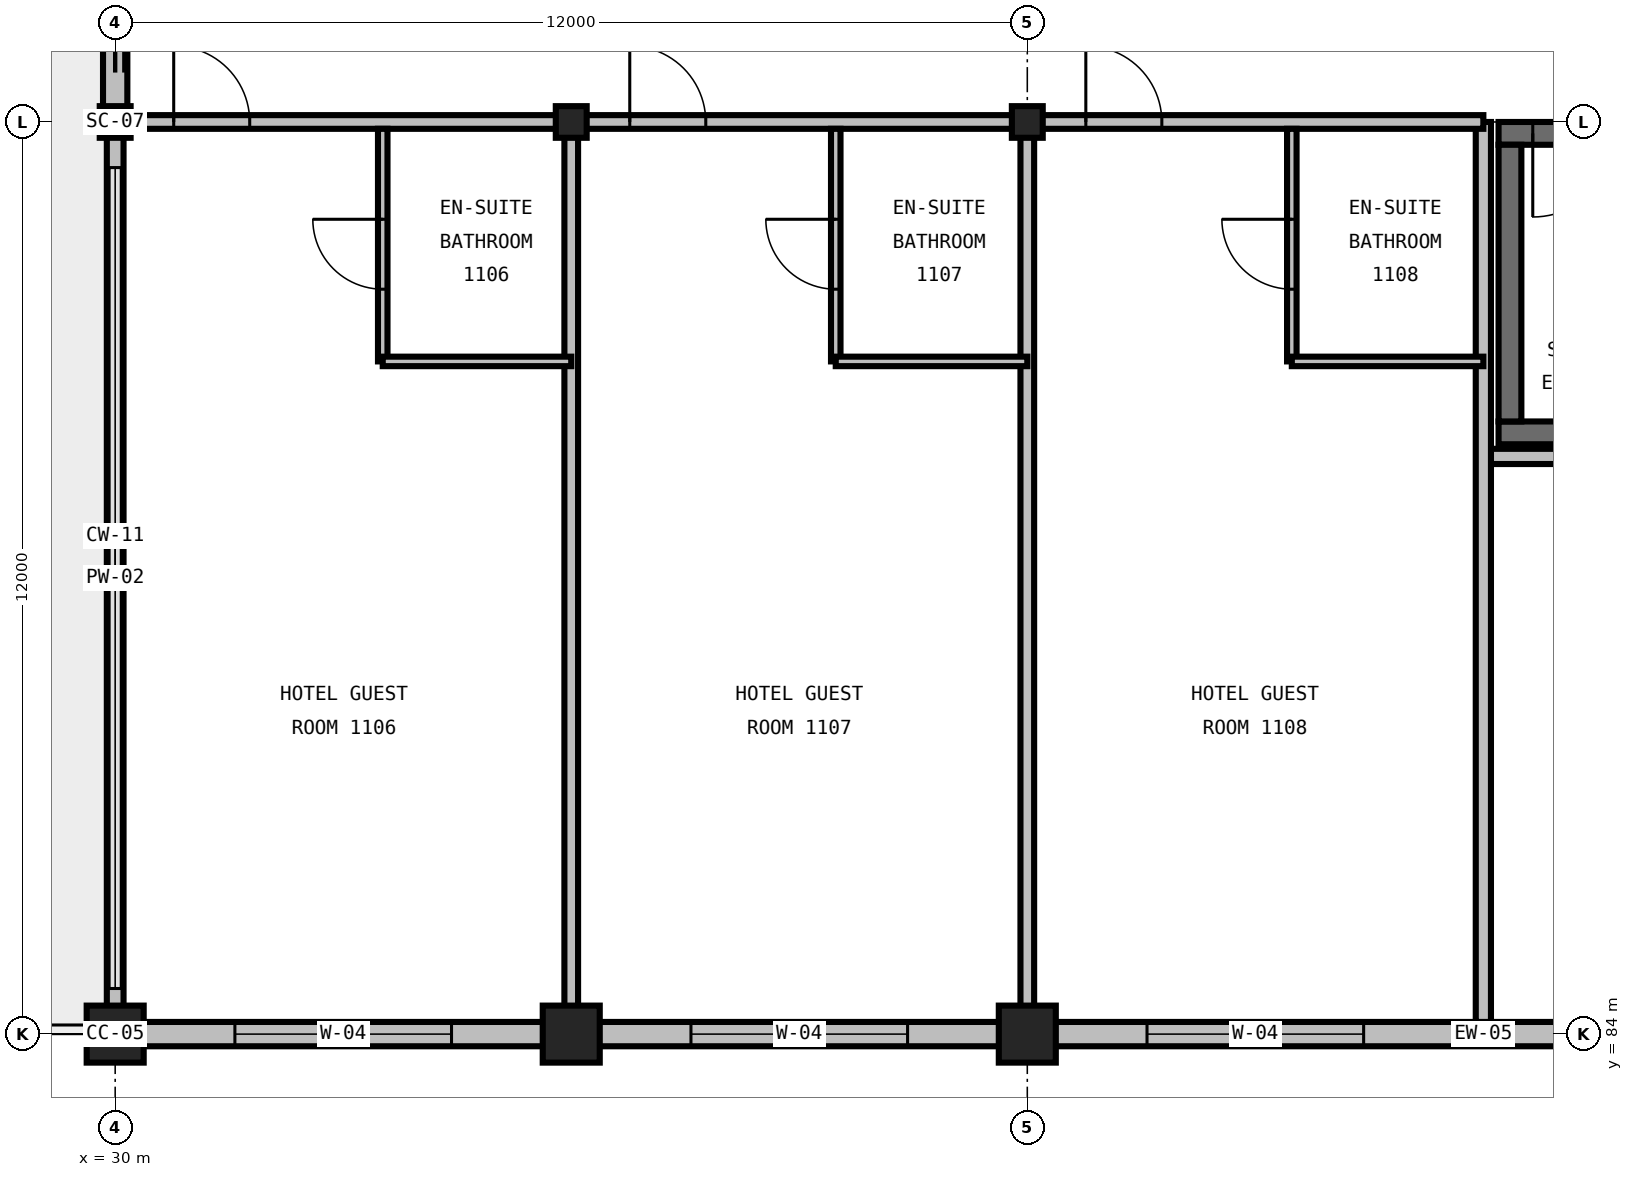
"""IFC4 building model, lengths in metres.
Left out: names, types, materials, properties, quantities, classifications, styles, units other than length and angle.
Written with IfcOpenShell. Run it as: python <this file> out.ifc"""

import sys

from ifc_helpers import new_model, si_unit, direction, frame, frame_2d, origin, origin_2d, place, context, subcontext, project, spatial, rectangle, i_section, extrude, element, fill, save


model = new_model("IFC4")
c1 = context("Model", 3, precision=1e-05, world=origin(), true_north=direction((0.0, 1.0)))
c2 = subcontext(c1, "Body", "Model", "MODEL_VIEW")
j1 = project(units=[si_unit("LENGTHUNIT", "METRE"), si_unit("PLANEANGLEUNIT", "RADIAN")], contexts=[c1])
p1 = place(None, origin())
s1 = spatial("IfcSite", under=j1, at=p1, CompositionType="ELEMENT")
p2 = place(p1, origin())
s2 = spatial("IfcBuilding", under=s1, at=p2, CompositionType="ELEMENT")
p3 = place(p2, frame((0.0, 0.0, 49.2)))
s3 = spatial("IfcBuildingStorey", under=s2, at=p3, CompositionType="ELEMENT", Elevation=49.2)
p4 = place(p3, frame((30.0, 84.0, 0.0), z_axis=(0.0, 0.0, 1.0), x_axis=(1.0, 0.0, 0.0)))
e1 = element("IfcColumn", 1, at=p4, inside=s3, PredefinedType="COLUMN", context=c2, shape_type="SweptSolid", body=[
    extrude(rectangle(XDim=0.75, YDim=0.75, at=origin_2d()), origin(), (0.0, 0.0, 1.0), 3.6),
])
p5 = place(p3, frame((30.0, 96.0, 0.0), z_axis=(0.0, 0.0, 1.0), x_axis=(1.0, 0.0, 0.0)))
e2 = element("IfcColumn", 2, at=p5, inside=s3, PredefinedType="COLUMN", context=c2, shape_type="SweptSolid", body=[
    extrude(i_section(OverallWidth=0.406, OverallDepth=0.416, WebThickness=0.03, FlangeThickness=0.048, FilletRadius=0.031, at=origin_2d()), origin(), (0.0, 0.0, 1.0), 3.6),
])
p6 = place(p3, frame((36.0, 84.0, 0.0), z_axis=(0.0, 0.0, 1.0), x_axis=(1.0, 0.0, 0.0)))
e3 = element("IfcColumn", 3, at=p6, inside=s3, PredefinedType="COLUMN", context=c2, shape_type="SweptSolid", body=[
    extrude(rectangle(XDim=0.75, YDim=0.75, at=origin_2d()), origin(), (0.0, 0.0, 1.0), 3.6),
])
p7 = place(p3, frame((36.0, 96.0, 0.0), z_axis=(0.0, 0.0, 1.0), x_axis=(1.0, 0.0, 0.0)))
e4 = element("IfcColumn", 4, at=p7, inside=s3, PredefinedType="COLUMN", context=c2, shape_type="SweptSolid", body=[
    extrude(i_section(OverallWidth=0.406, OverallDepth=0.416, WebThickness=0.03, FlangeThickness=0.048, FilletRadius=0.031, at=origin_2d()), origin(), (0.0, 0.0, 1.0), 3.6),
])
p8 = place(p3, frame((42.0, 84.0, 0.0), z_axis=(0.0, 0.0, 1.0), x_axis=(1.0, 0.0, 0.0)))
e5 = element("IfcColumn", 5, at=p8, inside=s3, PredefinedType="COLUMN", context=c2, shape_type="SweptSolid", body=[
    extrude(rectangle(XDim=0.75, YDim=0.75, at=origin_2d()), origin(), (0.0, 0.0, 1.0), 3.6),
])
p9 = place(p3, frame((42.0, 96.0, 0.0), z_axis=(0.0, 0.0, 1.0), x_axis=(1.0, 0.0, 0.0)))
e6 = element("IfcColumn", 6, at=p9, inside=s3, PredefinedType="COLUMN", context=c2, shape_type="SweptSolid", body=[
    extrude(i_section(OverallWidth=0.406, OverallDepth=0.416, WebThickness=0.03, FlangeThickness=0.048, FilletRadius=0.031, at=origin_2d()), origin(), (0.0, 0.0, 1.0), 3.6),
])
p10 = place(p3, frame((48.2, 91.91, 0.0), z_axis=(0.0, 0.0, 1.0), x_axis=(1.0, 0.0, 0.0)))
e7 = element("IfcWall", 7, at=p10, inside=s3, PredefinedType="SHEAR", context=c2, shape_type="SweptSolid", body=[
    extrude(rectangle(XDim=9.8, YDim=0.3, at=frame_2d((4.9, 0.0))), origin(), (0.0, 0.0, 1.0), 3.6),
])
p11 = place(p3, frame((58.0, 95.85, 0.0), z_axis=(0.0, 0.0, 1.0), x_axis=(-1.0, 0.0, 0.0)))
e8 = element("IfcWall", 8, at=p11, inside=s3, PredefinedType="SHEAR", context=c2, shape_type="SweptSolid", body=[
    extrude(rectangle(XDim=9.8, YDim=0.3, at=frame_2d((4.9, 0.0))), origin(), (0.0, 0.0, 1.0), 3.6),
])
p12 = place(p11, frame((8.25, 0.0, 0.0)))
e9 = element("IfcOpeningElement", 9, at=p12, cuts=e8, PredefinedType="OPENING", context=c2, shape_type="SweptSolid", body=[
    extrude(rectangle(XDim=1.1, YDim=2.2, at=frame_2d((0.55, 1.1))), frame((0.0, 0.165, 0.0), z_axis=(0.0, -1.0, 0.0), x_axis=(1.0, 0.0, 0.0)), (0.0, 0.0, 1.0), 0.33),
])
p13 = place(p3, frame((48.35, 95.7, 0.0), z_axis=(0.0, 0.0, 1.0), x_axis=(0.0, -1.0, 0.0)))
e10 = element("IfcWall", 10, at=p13, inside=s3, PredefinedType="SHEAR", context=c2, shape_type="SweptSolid", body=[
    extrude(rectangle(XDim=3.64, YDim=0.3, at=frame_2d((1.82, 0.0))), origin(), (0.0, 0.0, 1.0), 3.6),
])
p14 = place(p3, frame((30.0, 84.0, 0.0), z_axis=(0.0, 0.0, 1.0), x_axis=(1.0, 0.0, 0.0)))
e11 = element("IfcWall", 11, at=p14, inside=s3, PredefinedType="STANDARD", context=c2, shape_type="SweptSolid", body=[
    extrude(rectangle(XDim=6.0, YDim=0.32, at=frame_2d((3.0, 0.0))), origin(), (0.0, 0.0, 1.0), 2.536),
])
p15 = place(p14, frame((1.575, 0.0, 0.7)))
e12 = element("IfcOpeningElement", 12, at=p15, cuts=e11, PredefinedType="OPENING", context=c2, shape_type="SweptSolid", body=[
    extrude(rectangle(XDim=2.85, YDim=1.65, at=frame_2d((1.425, 0.825))), frame((0.0, 0.175, 0.0), z_axis=(0.0, -1.0, 0.0), x_axis=(1.0, 0.0, 0.0)), (0.0, 0.0, 1.0), 0.35),
])
p16 = place(p3, frame((36.0, 84.0, 0.0), z_axis=(0.0, 0.0, 1.0), x_axis=(1.0, 0.0, 0.0)))
e13 = element("IfcWall", 13, at=p16, inside=s3, PredefinedType="STANDARD", context=c2, shape_type="SweptSolid", body=[
    extrude(rectangle(XDim=6.0, YDim=0.32, at=frame_2d((3.0, 0.0))), origin(), (0.0, 0.0, 1.0), 2.536),
])
p17 = place(p16, frame((1.575, 0.0, 0.7)))
e14 = element("IfcOpeningElement", 14, at=p17, cuts=e13, PredefinedType="OPENING", context=c2, shape_type="SweptSolid", body=[
    extrude(rectangle(XDim=2.85, YDim=1.65, at=frame_2d((1.425, 0.825))), frame((0.0, 0.175, 0.0), z_axis=(0.0, -1.0, 0.0), x_axis=(1.0, 0.0, 0.0)), (0.0, 0.0, 1.0), 0.35),
])
p18 = place(p3, frame((42.0, 84.0, 0.0), z_axis=(0.0, 0.0, 1.0), x_axis=(1.0, 0.0, 0.0)))
e15 = element("IfcWall", 15, at=p18, inside=s3, PredefinedType="STANDARD", context=c2, shape_type="SweptSolid", body=[
    extrude(rectangle(XDim=12.0, YDim=0.32, at=frame_2d((6.0, 0.0))), origin(), (0.0, 0.0, 1.0), 2.536),
])
p19 = place(p18, frame((1.575, 0.0, 0.7)))
e16 = element("IfcOpeningElement", 16, at=p19, cuts=e15, PredefinedType="OPENING", context=c2, shape_type="SweptSolid", body=[
    extrude(rectangle(XDim=2.85, YDim=1.65, at=frame_2d((1.425, 0.825))), frame((0.0, 0.175, 0.0), z_axis=(0.0, -1.0, 0.0), x_axis=(1.0, 0.0, 0.0)), (0.0, 0.0, 1.0), 0.35),
])
p20 = place(p18, frame((7.575, 0.0, 0.7)))
e17 = element("IfcOpeningElement", 17, at=p20, cuts=e15, PredefinedType="OPENING", context=c2, shape_type="SweptSolid", body=[
    extrude(rectangle(XDim=2.85, YDim=1.65, at=frame_2d((1.425, 0.825))), frame((0.0, 0.175, 0.0), z_axis=(0.0, -1.0, 0.0), x_axis=(1.0, 0.0, 0.0)), (0.0, 0.0, 1.0), 0.35),
])
p21 = place(p3, frame((30.0, 96.0, 0.0), z_axis=(0.0, 0.0, 1.0), x_axis=(0.0, -1.0, 0.0)))
e18 = element("IfcWall", 18, at=p21, inside=s3, PredefinedType="PARAPET", context=c2, shape_type="SweptSolid", body=[
    extrude(rectangle(XDim=12.0, YDim=0.22, at=frame_2d((6.0, 0.0))), origin(), (0.0, 0.0, 1.0), 0.2),
])
p22 = place(p3, frame((30.0, 105.0, 0.0), z_axis=(0.0, 0.0, 1.0), x_axis=(0.0, -1.0, 0.0)))
e19 = element("IfcWall", 19, at=p22, inside=s3, PredefinedType="STANDARD", context=c2, shape_type="SweptSolid", body=[
    extrude(rectangle(XDim=9.0, YDim=0.32, at=frame_2d((4.5, 0.0))), origin(), (0.0, 0.0, 1.0), 2.981),
])
p23 = place(p22, frame((6.75, 0.0, 0.0)))
e20 = element("IfcOpeningElement", 20, at=p23, cuts=e19, PredefinedType="OPENING", context=c2, shape_type="SweptSolid", body=[
    extrude(rectangle(XDim=1.6, YDim=2.15, at=frame_2d((0.8, 1.075))), frame((0.0, 0.175, 0.0), z_axis=(0.0, -1.0, 0.0), x_axis=(1.0, 0.0, 0.0)), (0.0, 0.0, 1.0), 0.35),
])
p24 = place(p3, frame((48.0, 91.6, 0.0), z_axis=(0.0, 0.0, 1.0), x_axis=(1.0, 0.0, 0.0)))
e21 = element("IfcWall", 21, at=p24, inside=s3, PredefinedType="PARTITIONING", context=c2, shape_type="SweptSolid", body=[
    extrude(rectangle(XDim=10.4, YDim=0.2, at=frame_2d((5.2, 0.0))), origin(), (0.0, 0.0, 1.0), 3.29),
])
p25 = place(p3, frame((48.0, 84.16, 0.0), z_axis=(0.0, 0.0, 1.0), x_axis=(0.0, 1.0, 0.0)))
e22 = element("IfcWall", 22, at=p25, inside=s3, PredefinedType="PARTITIONING", context=c2, shape_type="SweptSolid", body=[
    extrude(rectangle(XDim=11.84, YDim=0.2, at=frame_2d((5.92, 0.0))), origin(), (0.0, 0.0, 1.0), 3.29),
])
p26 = place(p3, frame((30.085, 96.0, 0.0), z_axis=(0.0, 0.0, 1.0), x_axis=(1.0, 0.0, 0.0)))
e23 = element("IfcWall", 23, at=p26, inside=s3, PredefinedType="PARTITIONING", context=c2, shape_type="SweptSolid", body=[
    extrude(rectangle(XDim=5.915, YDim=0.18, at=frame_2d((2.957, 0.0))), origin(), (0.0, 0.0, 1.0), 2.736),
])
p27 = place(p26, frame((0.685, 0.0, 0.0)))
e24 = element("IfcOpeningElement", 24, at=p27, cuts=e23, PredefinedType="OPENING", context=c2, shape_type="SweptSolid", body=[
    extrude(rectangle(XDim=1.0, YDim=2.15, at=frame_2d((0.5, 1.075))), frame((0.0, 0.105, 0.0), z_axis=(0.0, -1.0, 0.0), x_axis=(1.0, 0.0, 0.0)), (0.0, 0.0, 1.0), 0.21),
])
p28 = place(p3, frame((36.0, 84.16, 0.0), z_axis=(0.0, 0.0, 1.0), x_axis=(0.0, 1.0, 0.0)))
e25 = element("IfcWall", 25, at=p28, inside=s3, PredefinedType="PARTITIONING", context=c2, shape_type="SweptSolid", body=[
    extrude(rectangle(XDim=11.84, YDim=0.18, at=frame_2d((5.92, 0.0))), origin(), (0.0, 0.0, 1.0), 2.59),
])
p29 = place(p3, frame((33.52, 92.85, 0.0), z_axis=(0.0, 0.0, 1.0), x_axis=(0.0, 1.0, 0.0)))
e26 = element("IfcWall", 26, at=p29, inside=s3, PredefinedType="PARTITIONING", context=c2, shape_type="SweptSolid", body=[
    extrude(rectangle(XDim=3.06, YDim=0.125, at=frame_2d((1.53, 0.0))), origin(), (0.0, 0.0, 1.0), 3.29),
])
p30 = place(p29, frame((0.95, 0.0, 0.0)))
e27 = element("IfcOpeningElement", 27, at=p30, cuts=e26, PredefinedType="OPENING", context=c2, shape_type="SweptSolid", body=[
    extrude(rectangle(XDim=0.92, YDim=2.1, at=frame_2d((0.46, 1.05))), frame((0.0, 0.077, 0.0), z_axis=(0.0, -1.0, 0.0), x_axis=(1.0, 0.0, 0.0)), (0.0, 0.0, 1.0), 0.155),
])
p31 = place(p3, frame((33.52, 92.85, 0.0), z_axis=(0.0, 0.0, 1.0), x_axis=(1.0, 0.0, 0.0)))
e28 = element("IfcWall", 28, at=p31, inside=s3, PredefinedType="PARTITIONING", context=c2, shape_type="SweptSolid", body=[
    extrude(rectangle(XDim=2.48, YDim=0.125, at=frame_2d((1.24, 0.0))), origin(), (0.0, 0.0, 1.0), 3.29),
])
p32 = place(p3, frame((36.0, 96.0, 0.0), z_axis=(0.0, 0.0, 1.0), x_axis=(1.0, 0.0, 0.0)))
e29 = element("IfcWall", 29, at=p32, inside=s3, PredefinedType="PARTITIONING", context=c2, shape_type="SweptSolid", body=[
    extrude(rectangle(XDim=6.0, YDim=0.18, at=frame_2d((3.0, 0.0))), origin(), (0.0, 0.0, 1.0), 2.736),
])
p33 = place(p32, frame((0.77, 0.0, 0.0)))
e30 = element("IfcOpeningElement", 30, at=p33, cuts=e29, PredefinedType="OPENING", context=c2, shape_type="SweptSolid", body=[
    extrude(rectangle(XDim=1.0, YDim=2.15, at=frame_2d((0.5, 1.075))), frame((0.0, 0.105, 0.0), z_axis=(0.0, -1.0, 0.0), x_axis=(1.0, 0.0, 0.0)), (0.0, 0.0, 1.0), 0.21),
])
p34 = place(p3, frame((42.0, 84.16, 0.0), z_axis=(0.0, 0.0, 1.0), x_axis=(0.0, 1.0, 0.0)))
e31 = element("IfcWall", 31, at=p34, inside=s3, PredefinedType="PARTITIONING", context=c2, shape_type="SweptSolid", body=[
    extrude(rectangle(XDim=11.84, YDim=0.18, at=frame_2d((5.92, 0.0))), origin(), (0.0, 0.0, 1.0), 2.59),
])
p35 = place(p3, frame((39.48, 92.85, 0.0), z_axis=(0.0, 0.0, 1.0), x_axis=(0.0, 1.0, 0.0)))
e32 = element("IfcWall", 32, at=p35, inside=s3, PredefinedType="PARTITIONING", context=c2, shape_type="SweptSolid", body=[
    extrude(rectangle(XDim=3.06, YDim=0.125, at=frame_2d((1.53, 0.0))), origin(), (0.0, 0.0, 1.0), 3.29),
])
p36 = place(p35, frame((0.95, 0.0, 0.0)))
e33 = element("IfcOpeningElement", 33, at=p36, cuts=e32, PredefinedType="OPENING", context=c2, shape_type="SweptSolid", body=[
    extrude(rectangle(XDim=0.92, YDim=2.1, at=frame_2d((0.46, 1.05))), frame((0.0, 0.077, 0.0), z_axis=(0.0, -1.0, 0.0), x_axis=(1.0, 0.0, 0.0)), (0.0, 0.0, 1.0), 0.155),
])
p37 = place(p3, frame((39.48, 92.85, 0.0), z_axis=(0.0, 0.0, 1.0), x_axis=(1.0, 0.0, 0.0)))
e34 = element("IfcWall", 34, at=p37, inside=s3, PredefinedType="PARTITIONING", context=c2, shape_type="SweptSolid", body=[
    extrude(rectangle(XDim=2.52, YDim=0.125, at=frame_2d((1.26, 0.0))), origin(), (0.0, 0.0, 1.0), 3.29),
])
p38 = place(p3, frame((42.0, 96.0, 0.0), z_axis=(0.0, 0.0, 1.0), x_axis=(1.0, 0.0, 0.0)))
e35 = element("IfcWall", 35, at=p38, inside=s3, PredefinedType="PARTITIONING", context=c2, shape_type="SweptSolid", body=[
    extrude(rectangle(XDim=6.0, YDim=0.18, at=frame_2d((3.0, 0.0))), origin(), (0.0, 0.0, 1.0), 2.359),
])
p39 = place(p38, frame((0.77, 0.0, 0.0)))
e36 = element("IfcOpeningElement", 36, at=p39, cuts=e35, PredefinedType="OPENING", context=c2, shape_type="SweptSolid", body=[
    extrude(rectangle(XDim=1.0, YDim=2.15, at=frame_2d((0.5, 1.075))), frame((0.0, 0.105, 0.0), z_axis=(0.0, -1.0, 0.0), x_axis=(1.0, 0.0, 0.0)), (0.0, 0.0, 1.0), 0.21),
])
p40 = place(p3, frame((45.48, 92.85, 0.0), z_axis=(0.0, 0.0, 1.0), x_axis=(0.0, 1.0, 0.0)))
e37 = element("IfcWall", 37, at=p40, inside=s3, PredefinedType="PARTITIONING", context=c2, shape_type="SweptSolid", body=[
    extrude(rectangle(XDim=3.06, YDim=0.125, at=frame_2d((1.53, 0.0))), origin(), (0.0, 0.0, 1.0), 3.29),
])
p41 = place(p40, frame((0.95, 0.0, 0.0)))
e38 = element("IfcOpeningElement", 38, at=p41, cuts=e37, PredefinedType="OPENING", context=c2, shape_type="SweptSolid", body=[
    extrude(rectangle(XDim=0.92, YDim=2.1, at=frame_2d((0.46, 1.05))), frame((0.0, 0.077, 0.0), z_axis=(0.0, -1.0, 0.0), x_axis=(1.0, 0.0, 0.0)), (0.0, 0.0, 1.0), 0.155),
])
p42 = place(p3, frame((45.48, 92.85, 0.0), z_axis=(0.0, 0.0, 1.0), x_axis=(1.0, 0.0, 0.0)))
e39 = element("IfcWall", 39, at=p42, inside=s3, PredefinedType="PARTITIONING", context=c2, shape_type="SweptSolid", body=[
    extrude(rectangle(XDim=2.52, YDim=0.125, at=frame_2d((1.26, 0.0))), origin(), (0.0, 0.0, 1.0), 3.29),
])
p43 = place(p12, origin())
e40 = element("IfcDoor", 40, at=p43, inside=s3, OperationType="SINGLE_SWING_RIGHT", PredefinedType="DOOR", context=c2, shape_type="SweptSolid", body=[
    extrude(rectangle(XDim=1.1, YDim=2.2, at=frame_2d((0.55, 1.1))), frame((0.0, 0.025, 0.0), z_axis=(0.0, -1.0, 0.0), x_axis=(1.0, 0.0, 0.0)), (0.0, 0.0, 1.0), 0.05),
])
fill(e9, e40)
p44 = place(p15, origin())
e41 = element("IfcWindow", 41, at=p44, inside=s3, PartitioningType="TRIPLE_PANEL_VERTICAL", PredefinedType="WINDOW", context=c2, shape_type="SweptSolid", body=[
    extrude(rectangle(XDim=2.85, YDim=1.65, at=frame_2d((1.425, 0.825))), frame((0.0, 0.03, 0.0), z_axis=(0.0, -1.0, 0.0), x_axis=(1.0, 0.0, 0.0)), (0.0, 0.0, 1.0), 0.06),
])
fill(e12, e41)
p45 = place(p17, origin())
e42 = element("IfcWindow", 42, at=p45, inside=s3, PartitioningType="TRIPLE_PANEL_VERTICAL", PredefinedType="WINDOW", context=c2, shape_type="SweptSolid", body=[
    extrude(rectangle(XDim=2.85, YDim=1.65, at=frame_2d((1.425, 0.825))), frame((0.0, 0.03, 0.0), z_axis=(0.0, -1.0, 0.0), x_axis=(1.0, 0.0, 0.0)), (0.0, 0.0, 1.0), 0.06),
])
fill(e14, e42)
p46 = place(p19, origin())
e43 = element("IfcWindow", 43, at=p46, inside=s3, PartitioningType="TRIPLE_PANEL_VERTICAL", PredefinedType="WINDOW", context=c2, shape_type="SweptSolid", body=[
    extrude(rectangle(XDim=2.85, YDim=1.65, at=frame_2d((1.425, 0.825))), frame((0.0, 0.03, 0.0), z_axis=(0.0, -1.0, 0.0), x_axis=(1.0, 0.0, 0.0)), (0.0, 0.0, 1.0), 0.06),
])
fill(e16, e43)
p47 = place(p23, origin())
e44 = element("IfcDoor", 44, at=p47, inside=s3, OperationType="DOUBLE_DOOR_SLIDING", PredefinedType="DOOR", context=c2, shape_type="SweptSolid", body=[
    extrude(rectangle(XDim=1.6, YDim=2.15, at=frame_2d((0.8, 1.075))), frame((0.0, 0.025, 0.0), z_axis=(0.0, -1.0, 0.0), x_axis=(1.0, 0.0, 0.0)), (0.0, 0.0, 1.0), 0.05),
])
fill(e20, e44)
p48 = place(p27, origin())
e45 = element("IfcDoor", 45, at=p48, inside=s3, OperationType="SINGLE_SWING_LEFT", PredefinedType="DOOR", context=c2, shape_type="SweptSolid", body=[
    extrude(rectangle(XDim=1.0, YDim=2.15, at=frame_2d((0.5, 1.075))), frame((0.0, 0.025, 0.0), z_axis=(0.0, -1.0, 0.0), x_axis=(1.0, 0.0, 0.0)), (0.0, 0.0, 1.0), 0.05),
])
fill(e24, e45)
p49 = place(p30, origin())
e46 = element("IfcDoor", 46, at=p49, inside=s3, OperationType="SINGLE_SWING_RIGHT", PredefinedType="DOOR", context=c2, shape_type="SweptSolid", body=[
    extrude(rectangle(XDim=0.92, YDim=2.1, at=frame_2d((0.46, 1.05))), frame((0.0, 0.025, 0.0), z_axis=(0.0, -1.0, 0.0), x_axis=(1.0, 0.0, 0.0)), (0.0, 0.0, 1.0), 0.05),
])
fill(e27, e46)
p50 = place(p33, origin())
e47 = element("IfcDoor", 47, at=p50, inside=s3, OperationType="SINGLE_SWING_LEFT", PredefinedType="DOOR", context=c2, shape_type="SweptSolid", body=[
    extrude(rectangle(XDim=1.0, YDim=2.15, at=frame_2d((0.5, 1.075))), frame((0.0, 0.025, 0.0), z_axis=(0.0, -1.0, 0.0), x_axis=(1.0, 0.0, 0.0)), (0.0, 0.0, 1.0), 0.05),
])
fill(e30, e47)
p51 = place(p36, origin())
e48 = element("IfcDoor", 48, at=p51, inside=s3, OperationType="SINGLE_SWING_RIGHT", PredefinedType="DOOR", context=c2, shape_type="SweptSolid", body=[
    extrude(rectangle(XDim=0.92, YDim=2.1, at=frame_2d((0.46, 1.05))), frame((0.0, 0.025, 0.0), z_axis=(0.0, -1.0, 0.0), x_axis=(1.0, 0.0, 0.0)), (0.0, 0.0, 1.0), 0.05),
])
fill(e33, e48)
p52 = place(p39, origin())
e49 = element("IfcDoor", 49, at=p52, inside=s3, OperationType="SINGLE_SWING_LEFT", PredefinedType="DOOR", context=c2, shape_type="SweptSolid", body=[
    extrude(rectangle(XDim=1.0, YDim=2.15, at=frame_2d((0.5, 1.075))), frame((0.0, 0.025, 0.0), z_axis=(0.0, -1.0, 0.0), x_axis=(1.0, 0.0, 0.0)), (0.0, 0.0, 1.0), 0.05),
])
fill(e36, e49)
p53 = place(p41, origin())
e50 = element("IfcDoor", 50, at=p53, inside=s3, OperationType="SINGLE_SWING_RIGHT", PredefinedType="DOOR", context=c2, shape_type="SweptSolid", body=[
    extrude(rectangle(XDim=0.92, YDim=2.1, at=frame_2d((0.46, 1.05))), frame((0.0, 0.025, 0.0), z_axis=(0.0, -1.0, 0.0), x_axis=(1.0, 0.0, 0.0)), (0.0, 0.0, 1.0), 0.05),
])
fill(e38, e50)
save(model, sys.argv[1])
